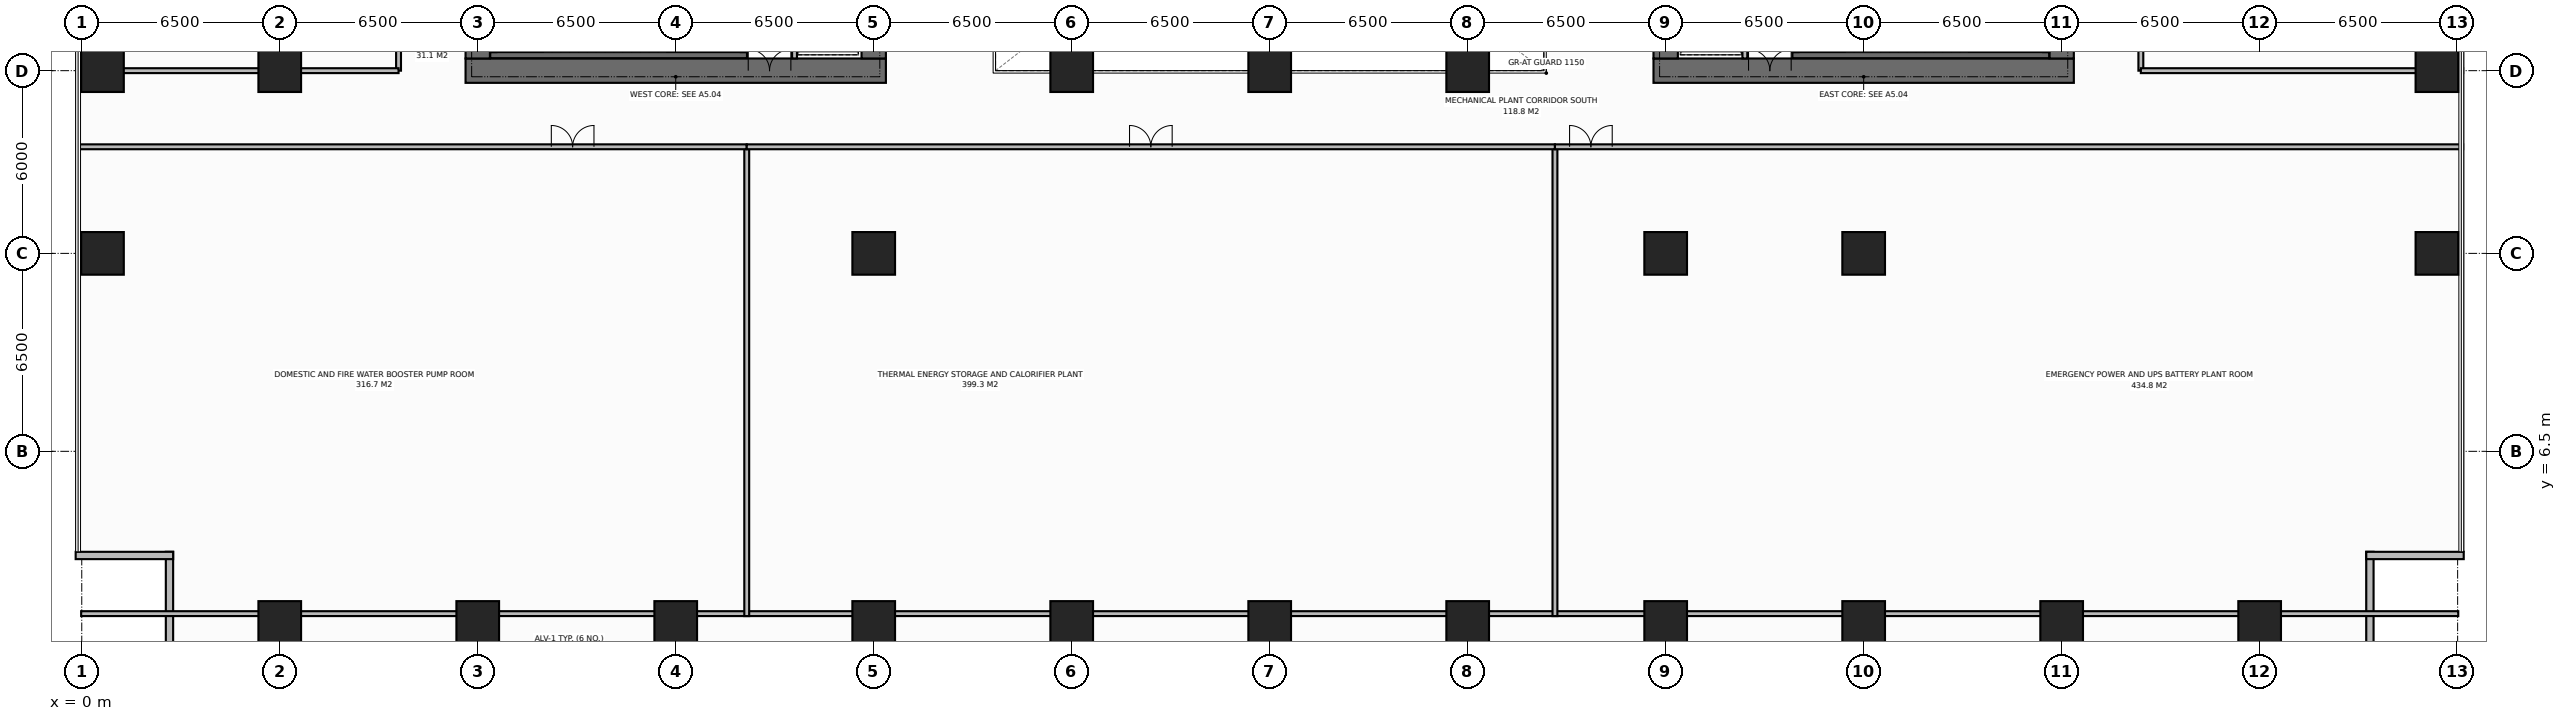
"""IFC4 building model, lengths in metres.
Left out: names, types, materials, properties, quantities, classifications, styles, units other than length and angle.
Written with IfcOpenShell. Run it as: python <this file> out.ifc"""

import sys

from ifc_helpers import new_model, si_unit, direction, frame, frame_2d, origin, origin_2d, place, context, subcontext, project, spatial, rectangle, extrude, element, fill, save


model = new_model("IFC4")
c1 = context("Model", 3, precision=1e-05, world=origin(), true_north=direction((0.0, 1.0)))
c2 = subcontext(c1, "Body", "Model", "MODEL_VIEW")
j1 = project(units=[si_unit("LENGTHUNIT", "METRE"), si_unit("PLANEANGLEUNIT", "RADIAN")], contexts=[c1])
p1 = place(None, origin())
s1 = spatial("IfcSite", under=j1, at=p1, CompositionType="ELEMENT")
p2 = place(p1, origin())
s2 = spatial("IfcBuilding", under=s1, at=p2, CompositionType="ELEMENT")
p3 = place(p2, frame((0.0, 0.0, 81.0)))
s3 = spatial("IfcBuildingStorey", under=s2, at=p3, CompositionType="ELEMENT", Elevation=81.0)
p4 = place(p3, frame((12.6, 19.0, 0.0), z_axis=(0.0, 0.0, 1.0), x_axis=(1.0, 0.0, 0.0)))
e1 = element("IfcWall", 1, at=p4, inside=s3, PredefinedType="SHEAR", context=c2, shape_type="SweptSolid", body=[
    extrude(rectangle(XDim=13.8, YDim=0.8, at=frame_2d((6.9, 0.0))), origin(), (0.0, 0.0, 1.0), 5.0),
])
p5 = place(p4, frame((9.28, 0.0, 0.0)))
e2 = element("IfcOpeningElement", 2, at=p5, cuts=e1, PredefinedType="OPENING", context=c2, shape_type="SweptSolid", body=[
    extrude(rectangle(XDim=1.4, YDim=2.2, at=frame_2d((0.7, 1.1))), frame((0.0, 0.41, 0.0), z_axis=(0.0, -1.0, 0.0), x_axis=(1.0, 0.0, 0.0)), (0.0, 0.0, 1.0), 0.82),
])
p6 = place(p3, frame((13.0, 19.4, 0.0), z_axis=(0.0, 0.0, 1.0), x_axis=(0.0, 1.0, 0.0)))
e3 = element("IfcWall", 3, at=p6, inside=s3, PredefinedType="SHEAR", context=c2, shape_type="SweptSolid", body=[
    extrude(rectangle(XDim=13.2, YDim=0.8, at=frame_2d((6.6, 0.0))), origin(), (0.0, 0.0, 1.0), 5.0),
])
p7 = place(p6, frame((4.65, 0.0, 0.0)))
e4 = element("IfcOpeningElement", 4, at=p7, cuts=e3, PredefinedType="OPENING", context=c2, shape_type="SweptSolid", body=[
    extrude(rectangle(XDim=1.4, YDim=2.2, at=frame_2d((0.7, 1.1))), frame((0.0, 0.41, 0.0), z_axis=(0.0, -1.0, 0.0), x_axis=(1.0, 0.0, 0.0)), (0.0, 0.0, 1.0), 0.82),
])
p8 = place(p3, frame((26.0, 19.4, 0.0), z_axis=(0.0, 0.0, 1.0), x_axis=(0.0, 1.0, 0.0)))
e5 = element("IfcWall", 5, at=p8, inside=s3, PredefinedType="SHEAR", context=c2, shape_type="SweptSolid", body=[
    extrude(rectangle(XDim=13.2, YDim=0.8, at=frame_2d((6.6, 0.0))), origin(), (0.0, 0.0, 1.0), 5.0),
])
p9 = place(p3, frame((51.6, 19.0, 0.0), z_axis=(0.0, 0.0, 1.0), x_axis=(1.0, 0.0, 0.0)))
e6 = element("IfcWall", 6, at=p9, inside=s3, PredefinedType="SHEAR", context=c2, shape_type="SweptSolid", body=[
    extrude(rectangle(XDim=13.8, YDim=0.8, at=frame_2d((6.9, 0.0))), origin(), (0.0, 0.0, 1.0), 5.0),
])
p10 = place(p9, frame((3.12, 0.0, 0.0)))
e7 = element("IfcOpeningElement", 7, at=p10, cuts=e6, PredefinedType="OPENING", context=c2, shape_type="SweptSolid", body=[
    extrude(rectangle(XDim=1.4, YDim=2.2, at=frame_2d((0.7, 1.1))), frame((0.0, 0.41, 0.0), z_axis=(0.0, -1.0, 0.0), x_axis=(1.0, 0.0, 0.0)), (0.0, 0.0, 1.0), 0.82),
])
p11 = place(p3, frame((52.0, 19.4, 0.0), z_axis=(0.0, 0.0, 1.0), x_axis=(0.0, 1.0, 0.0)))
e8 = element("IfcWall", 8, at=p11, inside=s3, PredefinedType="SHEAR", context=c2, shape_type="SweptSolid", body=[
    extrude(rectangle(XDim=13.2, YDim=0.8, at=frame_2d((6.6, 0.0))), origin(), (0.0, 0.0, 1.0), 5.0),
])
p12 = place(p3, frame((65.0, 19.4, 0.0), z_axis=(0.0, 0.0, 1.0), x_axis=(0.0, 1.0, 0.0)))
e9 = element("IfcWall", 9, at=p12, inside=s3, PredefinedType="SHEAR", context=c2, shape_type="SweptSolid", body=[
    extrude(rectangle(XDim=13.2, YDim=0.8, at=frame_2d((6.6, 0.0))), origin(), (0.0, 0.0, 1.0), 5.0),
])
p13 = place(p12, frame((8.05, 0.0, 0.0)))
e10 = element("IfcOpeningElement", 10, at=p13, cuts=e9, PredefinedType="OPENING", context=c2, shape_type="SweptSolid", body=[
    extrude(rectangle(XDim=1.3, YDim=2.2, at=frame_2d((0.65, 1.1))), frame((0.0, 0.41, 0.0), z_axis=(0.0, -1.0, 0.0), x_axis=(1.0, 0.0, 0.0)), (0.0, 0.0, 1.0), 0.82),
])
for number, where, z_axis, x_axis in (
    (11, (13.41, 19.51, 0.0), (0.0, 0.0, 1.0), (1.0, 0.0, 0.0)),
    (12, (56.16, 19.51, 0.0), (0.0, 0.0, 1.0), (1.0, 0.0, 0.0)),
):
    element("IfcWall", number, at=place(p3, frame(where, z_axis=z_axis, x_axis=x_axis)), inside=s3, PredefinedType="SHEAR", context=c2, shape_type="SweptSolid", body=[
        extrude(rectangle(XDim=8.43, YDim=0.2, at=frame_2d((4.215, 0.0))), origin(), (0.0, 0.0, 1.0), 5.0),
    ])
for number, where, z_axis, x_axis in (
    (13, (58.5, 13.0, 0.0), (0.0, 0.0, 1.0), (1.0, 0.0, 0.0)),
    (14, (6.5, 19.0, 0.0), (0.0, 0.0, 1.0), (1.0, 0.0, 0.0)),
    (15, (32.5, 19.0, 0.0), (0.0, 0.0, 1.0), (1.0, 0.0, 0.0)),
    (16, (39.0, 19.0, 0.0), (0.0, 0.0, 1.0), (1.0, 0.0, 0.0)),
    (17, (45.5, 19.0, 0.0), (0.0, 0.0, 1.0), (1.0, 0.0, 0.0)),
    (18, (26.0, 13.0, 0.0), (0.0, 0.0, 1.0), (1.0, 0.0, 0.0)),
    (19, (52.0, 13.0, 0.0), (0.0, 0.0, 1.0), (1.0, 0.0, 0.0)),
    (20, (6.5, 0.88, 0.0), (0.0, 0.0, 1.0), (1.0, 0.0, 0.0)),
    (21, (13.0, 0.88, 0.0), (0.0, 0.0, 1.0), (1.0, 0.0, 0.0)),
    (22, (19.5, 0.88, 0.0), (0.0, 0.0, 1.0), (1.0, 0.0, 0.0)),
    (23, (26.0, 0.88, 0.0), (0.0, 0.0, 1.0), (1.0, 0.0, 0.0)),
    (24, (32.5, 0.88, 0.0), (0.0, 0.0, 1.0), (1.0, 0.0, 0.0)),
    (25, (39.0, 0.88, 0.0), (0.0, 0.0, 1.0), (1.0, 0.0, 0.0)),
    (26, (45.5, 0.88, 0.0), (0.0, 0.0, 1.0), (1.0, 0.0, 0.0)),
    (27, (52.0, 0.88, 0.0), (0.0, 0.0, 1.0), (1.0, 0.0, 0.0)),
    (28, (58.5, 0.88, 0.0), (0.0, 0.0, 1.0), (1.0, 0.0, 0.0)),
    (29, (65.0, 0.88, 0.0), (0.0, 0.0, 1.0), (1.0, 0.0, 0.0)),
    (30, (71.5, 0.88, 0.0), (0.0, 0.0, 1.0), (1.0, 0.0, 0.0)),
    (31, (0.68, 13.0, 0.0), (0.0, 0.0, 1.0), (1.0, 0.0, 0.0)),
    (32, (77.32, 13.0, 0.0), (0.0, 0.0, 1.0), (1.0, 0.0, 0.0)),
    (33, (0.68, 19.0, 0.0), (0.0, 0.0, 1.0), (1.0, 0.0, 0.0)),
    (34, (77.32, 19.0, 0.0), (0.0, 0.0, 1.0), (1.0, 0.0, 0.0)),
):
    element("IfcColumn", number, at=place(p3, frame(where, z_axis=z_axis, x_axis=x_axis)), inside=s3, PredefinedType="COLUMN", context=c2, shape_type="SweptSolid", body=[
        extrude(rectangle(XDim=1.4, YDim=1.4, at=origin_2d()), origin(), (0.0, 0.0, 1.0), 5.0),
    ])
for number, where, z_axis, x_axis in (
    (35, (2.88, 0.0, 0.0), (0.0, 0.0, 1.0), (0.0, 1.0, 0.0)),
    (36, (3.0, 3.08, 0.0), (0.0, 0.0, 1.0), (-1.0, 0.0, 0.0)),
    (37, (75.12, 3.2, 0.0), (0.0, 0.0, 1.0), (0.0, -1.0, 0.0)),
    (38, (78.2, 3.08, 0.0), (0.0, 0.0, 1.0), (-1.0, 0.0, 0.0)),
):
    element("IfcWall", number, at=place(p3, frame(where, z_axis=z_axis, x_axis=x_axis)), inside=s3, PredefinedType="STANDARD", context=c2, shape_type="SweptSolid", body=[
        extrude(rectangle(XDim=3.2, YDim=0.24, at=frame_2d((1.6, 0.0))), origin(), (0.0, 0.0, 1.0), 4.765),
    ])
p14 = place(p3, frame((23.4, 19.4, 0.0), z_axis=(0.0, 0.0, 1.0), x_axis=(0.0, 1.0, 0.0)))
e39 = element("IfcWall", 39, at=p14, inside=s3, PredefinedType="STANDARD", context=c2, shape_type="SweptSolid", body=[
    extrude(rectangle(XDim=13.2, YDim=0.16, at=frame_2d((6.6, 0.0))), origin(), (0.0, 0.0, 1.0), 4.765),
])
p15 = place(p14, frame((0.55, 0.0, 0.0)))
e40 = element("IfcOpeningElement", 40, at=p15, cuts=e39, PredefinedType="OPENING", context=c2, shape_type="SweptSolid", body=[
    extrude(rectangle(XDim=1.1, YDim=2.2, at=frame_2d((0.55, 1.1))), frame((0.0, 0.09, 0.0), z_axis=(0.0, -1.0, 0.0), x_axis=(1.0, 0.0, 0.0)), (0.0, 0.0, 1.0), 0.18),
])
p16 = place(p14, frame((2.7, 0.0, 0.0)))
e41 = element("IfcOpeningElement", 41, at=p16, cuts=e39, PredefinedType="OPENING", context=c2, shape_type="SweptSolid", body=[
    extrude(rectangle(XDim=1.1, YDim=2.2, at=frame_2d((0.55, 1.1))), frame((0.0, 0.09, 0.0), z_axis=(0.0, -1.0, 0.0), x_axis=(1.0, 0.0, 0.0)), (0.0, 0.0, 1.0), 0.18),
])
p17 = place(p3, frame((54.6, 19.4, 0.0), z_axis=(0.0, 0.0, 1.0), x_axis=(0.0, 1.0, 0.0)))
e42 = element("IfcWall", 42, at=p17, inside=s3, PredefinedType="STANDARD", context=c2, shape_type="SweptSolid", body=[
    extrude(rectangle(XDim=13.2, YDim=0.16, at=frame_2d((6.6, 0.0))), origin(), (0.0, 0.0, 1.0), 4.765),
])
p18 = place(p17, frame((0.55, 0.0, 0.0)))
e43 = element("IfcOpeningElement", 43, at=p18, cuts=e42, PredefinedType="OPENING", context=c2, shape_type="SweptSolid", body=[
    extrude(rectangle(XDim=1.1, YDim=2.2, at=frame_2d((0.55, 1.1))), frame((0.0, 0.09, 0.0), z_axis=(0.0, -1.0, 0.0), x_axis=(1.0, 0.0, 0.0)), (0.0, 0.0, 1.0), 0.18),
])
p19 = place(p17, frame((2.7, 0.0, 0.0)))
e44 = element("IfcOpeningElement", 44, at=p19, cuts=e42, PredefinedType="OPENING", context=c2, shape_type="SweptSolid", body=[
    extrude(rectangle(XDim=1.1, YDim=2.2, at=frame_2d((0.55, 1.1))), frame((0.0, 0.09, 0.0), z_axis=(0.0, -1.0, 0.0), x_axis=(1.0, 0.0, 0.0)), (0.0, 0.0, 1.0), 0.18),
])
p20 = place(p3, frame((-0.02, 1.17, 0.0), z_axis=(0.0, 0.0, 1.0), x_axis=(1.0, 0.0, 0.0)))
e45 = element("IfcWall", 45, at=p20, inside=s3, PredefinedType="STANDARD", context=c2, shape_type="SweptSolid", body=[
    extrude(rectangle(XDim=78.04, YDim=0.16, at=frame_2d((39.02, 0.0))), origin(), (0.0, 0.0, 1.0), 4.765),
])
p21 = place(p3, frame((10.4, 19.0, 0.0), z_axis=(0.0, 0.0, 1.0), x_axis=(0.0, 1.0, 0.0)))
e46 = element("IfcWall", 46, at=p21, inside=s3, PredefinedType="STANDARD", context=c2, shape_type="SweptSolid", body=[
    extrude(rectangle(XDim=14.0, YDim=0.16, at=frame_2d((7.0, 0.0))), origin(), (0.0, 0.0, 1.0), 4.765),
])
p22 = place(p21, frame((5.2, 0.0, 0.0)))
e47 = element("IfcOpeningElement", 47, at=p22, cuts=e46, PredefinedType="OPENING", context=c2, shape_type="SweptSolid", body=[
    extrude(rectangle(XDim=1.4, YDim=2.2, at=frame_2d((0.7, 1.1))), frame((0.0, 0.09, 0.0), z_axis=(0.0, -1.0, 0.0), x_axis=(1.0, 0.0, 0.0)), (0.0, 0.0, 1.0), 0.18),
])
p23 = place(p3, frame((-0.18, 19.0, 0.0), z_axis=(0.0, 0.0, 1.0), x_axis=(1.0, 0.0, 0.0)))
e48 = element("IfcWall", 48, at=p23, inside=s3, PredefinedType="STANDARD", context=c2, shape_type="SweptSolid", body=[
    extrude(rectangle(XDim=10.58, YDim=0.16, at=frame_2d((5.29, 0.0))), origin(), (0.0, 0.0, 1.0), 3.245),
])
p24 = place(p3, frame((67.6, 19.0, 0.0), z_axis=(0.0, 0.0, 1.0), x_axis=(0.0, 1.0, 0.0)))
e49 = element("IfcWall", 49, at=p24, inside=s3, PredefinedType="STANDARD", context=c2, shape_type="SweptSolid", body=[
    extrude(rectangle(XDim=14.0, YDim=0.16, at=frame_2d((7.0, 0.0))), origin(), (0.0, 0.0, 1.0), 4.765),
])
p25 = place(p24, frame((5.2, 0.0, 0.0)))
e50 = element("IfcOpeningElement", 50, at=p25, cuts=e49, PredefinedType="OPENING", context=c2, shape_type="SweptSolid", body=[
    extrude(rectangle(XDim=1.4, YDim=2.2, at=frame_2d((0.7, 1.1))), frame((0.0, 0.09, 0.0), z_axis=(0.0, -1.0, 0.0), x_axis=(1.0, 0.0, 0.0)), (0.0, 0.0, 1.0), 0.18),
])
p26 = place(p3, frame((67.6, 19.0, 0.0), z_axis=(0.0, 0.0, 1.0), x_axis=(1.0, 0.0, 0.0)))
e51 = element("IfcWall", 51, at=p26, inside=s3, PredefinedType="STANDARD", context=c2, shape_type="SweptSolid", body=[
    extrude(rectangle(XDim=10.58, YDim=0.16, at=frame_2d((5.29, 0.0))), origin(), (0.0, 0.0, 1.0), 3.245),
])
p27 = place(p3, frame((21.831, 1.09, 0.0), z_axis=(0.0, 0.0, 1.0), x_axis=(0.0, 1.0, 0.0)))
e52 = element("IfcWall", 52, at=p27, inside=s3, PredefinedType="STANDARD", context=c2, shape_type="SweptSolid", body=[
    extrude(rectangle(XDim=15.41, YDim=0.16, at=frame_2d((7.705, 0.0))), origin(), (0.0, 0.0, 1.0), 4.765),
])
p28 = place(p3, frame((-0.18, 16.5, 0.0), z_axis=(0.0, 0.0, 1.0), x_axis=(1.0, 0.0, 0.0)))
e53 = element("IfcWall", 53, at=p28, inside=s3, PredefinedType="STANDARD", context=c2, shape_type="SweptSolid", body=[
    extrude(rectangle(XDim=22.011, YDim=0.16, at=frame_2d((11.006, 0.0))), origin(), (0.0, 0.0, 1.0), 4.765),
])
p29 = place(p28, frame((15.596, 0.0, 0.0)))
e54 = element("IfcOpeningElement", 54, at=p29, cuts=e53, PredefinedType="OPENING", context=c2, shape_type="SweptSolid", body=[
    extrude(rectangle(XDim=1.4, YDim=2.2, at=frame_2d((0.7, 1.1))), frame((0.0, 0.09, 0.0), z_axis=(0.0, -1.0, 0.0), x_axis=(1.0, 0.0, 0.0)), (0.0, 0.0, 1.0), 0.18),
])
p30 = place(p3, frame((48.365, 1.09, 0.0), z_axis=(0.0, 0.0, 1.0), x_axis=(0.0, 1.0, 0.0)))
e55 = element("IfcWall", 55, at=p30, inside=s3, PredefinedType="STANDARD", context=c2, shape_type="SweptSolid", body=[
    extrude(rectangle(XDim=15.41, YDim=0.16, at=frame_2d((7.705, 0.0))), origin(), (0.0, 0.0, 1.0), 4.765),
])
p31 = place(p3, frame((21.831, 16.5, 0.0), z_axis=(0.0, 0.0, 1.0), x_axis=(1.0, 0.0, 0.0)))
e56 = element("IfcWall", 56, at=p31, inside=s3, PredefinedType="STANDARD", context=c2, shape_type="SweptSolid", body=[
    extrude(rectangle(XDim=26.533, YDim=0.16, at=frame_2d((13.267, 0.0))), origin(), (0.0, 0.0, 1.0), 4.765),
])
p32 = place(p31, frame((12.567, 0.0, 0.0)))
e57 = element("IfcOpeningElement", 57, at=p32, cuts=e56, PredefinedType="OPENING", context=c2, shape_type="SweptSolid", body=[
    extrude(rectangle(XDim=1.4, YDim=2.2, at=frame_2d((0.7, 1.1))), frame((0.0, 0.09, 0.0), z_axis=(0.0, -1.0, 0.0), x_axis=(1.0, 0.0, 0.0)), (0.0, 0.0, 1.0), 0.18),
])
p33 = place(p3, frame((48.365, 16.5, 0.0), z_axis=(0.0, 0.0, 1.0), x_axis=(1.0, 0.0, 0.0)))
e58 = element("IfcWall", 58, at=p33, inside=s3, PredefinedType="STANDARD", context=c2, shape_type="SweptSolid", body=[
    extrude(rectangle(XDim=29.815, YDim=0.16, at=frame_2d((14.908, 0.0))), origin(), (0.0, 0.0, 1.0), 4.765),
])
p34 = place(p33, frame((0.48, 0.0, 0.0)))
e59 = element("IfcOpeningElement", 59, at=p34, cuts=e58, PredefinedType="OPENING", context=c2, shape_type="SweptSolid", body=[
    extrude(rectangle(XDim=1.4, YDim=2.2, at=frame_2d((0.7, 1.1))), frame((0.0, 0.09, 0.0), z_axis=(0.0, -1.0, 0.0), x_axis=(1.0, 0.0, 0.0)), (0.0, 0.0, 1.0), 0.18),
])
p35 = place(p5, origin())
e60 = element("IfcDoor", 60, at=p35, inside=s3, OperationType="DOUBLE_DOOR_SINGLE_SWING", PredefinedType="DOOR", context=c2, shape_type="SweptSolid", body=[
    extrude(rectangle(XDim=1.4, YDim=2.2, at=frame_2d((0.7, 1.1))), frame((0.0, 0.125, 0.0), z_axis=(0.0, -1.0, 0.0), x_axis=(1.0, 0.0, 0.0)), (0.0, 0.0, 1.0), 0.05),
])
fill(e2, e60)
p36 = place(p10, origin())
e61 = element("IfcDoor", 61, at=p36, inside=s3, OperationType="DOUBLE_DOOR_SINGLE_SWING", PredefinedType="DOOR", context=c2, shape_type="SweptSolid", body=[
    extrude(rectangle(XDim=1.4, YDim=2.2, at=frame_2d((0.7, 1.1))), frame((0.0, 0.125, 0.0), z_axis=(0.0, -1.0, 0.0), x_axis=(1.0, 0.0, 0.0)), (0.0, 0.0, 1.0), 0.05),
])
fill(e7, e61)
p37 = place(p29, origin())
e62 = element("IfcDoor", 62, at=p37, inside=s3, OperationType="DOUBLE_DOOR_SINGLE_SWING", PredefinedType="DOOR", context=c2, shape_type="SweptSolid", body=[
    extrude(rectangle(XDim=1.4, YDim=2.2, at=frame_2d((0.7, 1.1))), frame((0.0, 0.025, 0.0), z_axis=(0.0, -1.0, 0.0), x_axis=(1.0, 0.0, 0.0)), (0.0, 0.0, 1.0), 0.05),
])
fill(e54, e62)
p38 = place(p32, origin())
e63 = element("IfcDoor", 63, at=p38, inside=s3, OperationType="DOUBLE_DOOR_SINGLE_SWING", PredefinedType="DOOR", context=c2, shape_type="SweptSolid", body=[
    extrude(rectangle(XDim=1.4, YDim=2.2, at=frame_2d((0.7, 1.1))), frame((0.0, 0.025, 0.0), z_axis=(0.0, -1.0, 0.0), x_axis=(1.0, 0.0, 0.0)), (0.0, 0.0, 1.0), 0.05),
])
fill(e57, e63)
p39 = place(p34, origin())
e64 = element("IfcDoor", 64, at=p39, inside=s3, OperationType="DOUBLE_DOOR_SINGLE_SWING", PredefinedType="DOOR", context=c2, shape_type="SweptSolid", body=[
    extrude(rectangle(XDim=1.4, YDim=2.2, at=frame_2d((0.7, 1.1))), frame((0.0, 0.025, 0.0), z_axis=(0.0, -1.0, 0.0), x_axis=(1.0, 0.0, 0.0)), (0.0, 0.0, 1.0), 0.05),
])
fill(e59, e64)
save(model, sys.argv[1])
